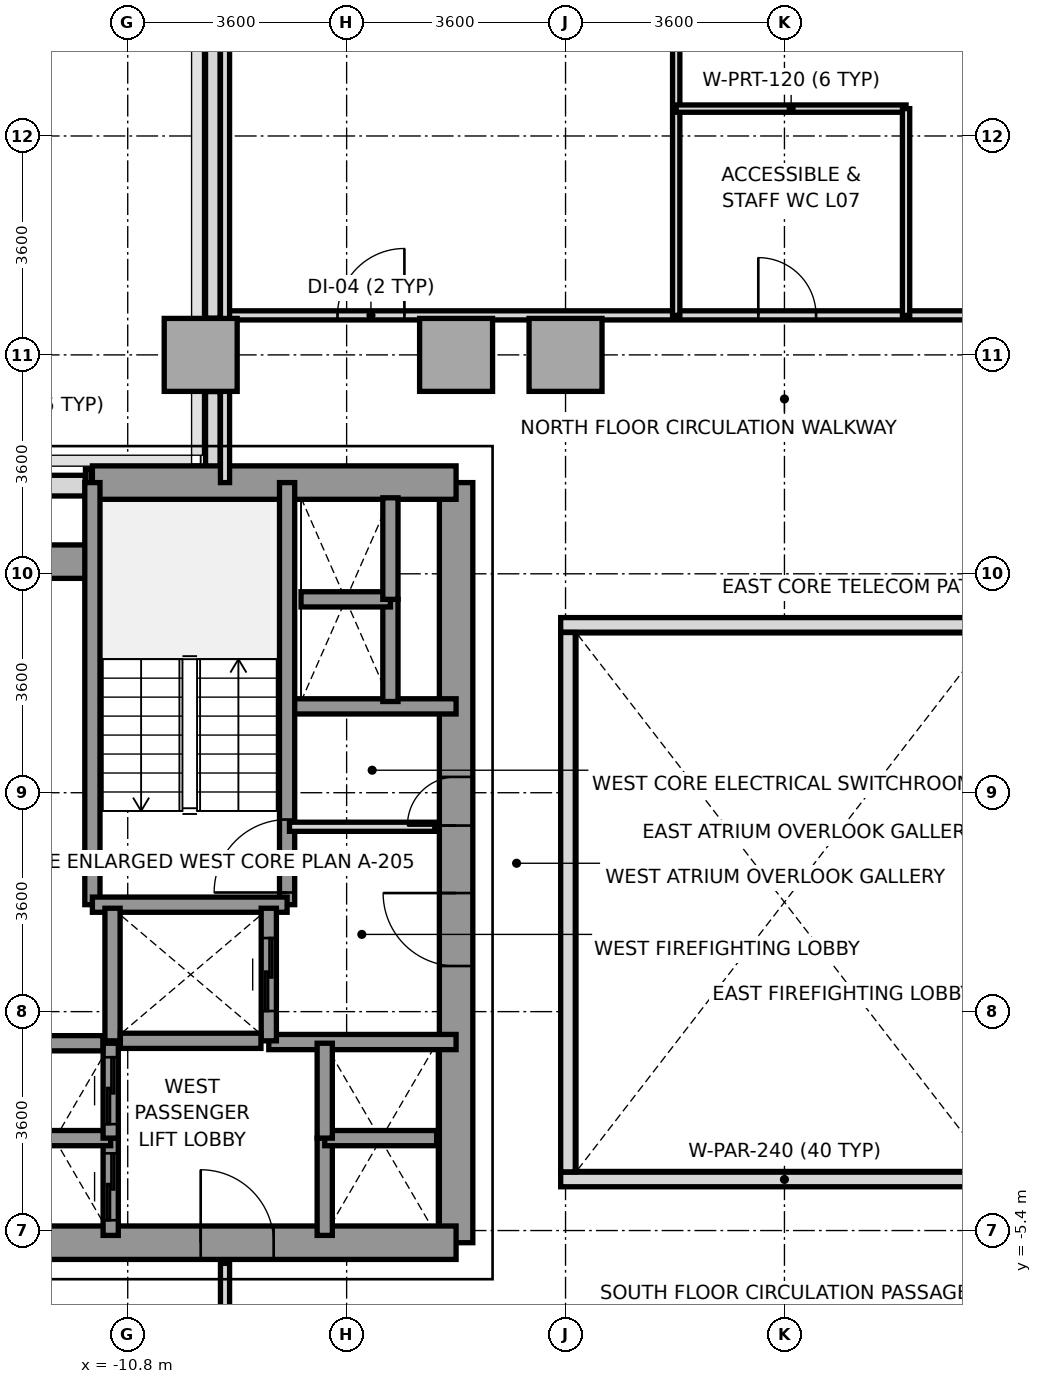
"""IFC4 building model, lengths in metres.
Left out: names, types, materials, properties, quantities, classifications, styles, units other than length and angle.
Written with IfcOpenShell. Run it as: python <this file> out.ifc"""

import sys

from ifc_helpers import new_model, si_unit, direction, frame, frame_2d, origin, origin_2d, place, context, subcontext, project, spatial, rectangle, extrude, source, transform, mapped, element, fill, save


model = new_model("IFC4")
c1 = context("Model", 3, precision=1e-05, world=origin(), true_north=direction((0.0, 1.0)))
c2 = subcontext(c1, "Body", "Model", "MODEL_VIEW")
j1 = project(units=[si_unit("LENGTHUNIT", "METRE"), si_unit("PLANEANGLEUNIT", "RADIAN")], contexts=[c1])
p1 = place(None, origin())
s1 = spatial("IfcSite", under=j1, at=p1, CompositionType="ELEMENT")
p2 = place(p1, origin())
s2 = spatial("IfcBuilding", under=s1, at=p2, CompositionType="ELEMENT")
p3 = place(p2, frame((0.0, 0.0, 34.0)))
s3 = spatial("IfcBuildingStorey", under=s2, at=p3, CompositionType="ELEMENT", Elevation=34.0)
m1 = source(origin(), c2, "Body", "SweptSolid", [
    extrude(rectangle(XDim=1.2, YDim=1.2, at=origin_2d()), origin(), (0.0, 0.0, 1.0), 3.2),
])
for number, where, z_axis, x_axis in (
    (1, (-9.6, 9.0, 0.0), (0.0, 0.0, 1.0), (1.0, 0.0, 0.0)),
    (2, (-5.4, 9.0, 0.0), (0.0, 0.0, 1.0), (1.0, 0.0, 0.0)),
    (3, (-3.6, 9.0, 0.0), (0.0, 0.0, 1.0), (1.0, 0.0, 0.0)),
):
    element("IfcColumn", number, at=place(p3, frame(where, z_axis=z_axis, x_axis=x_axis)), inside=s3, PredefinedType="COLUMN", context=c2, shape_type="MappedRepresentation", body=[
        mapped(m1, transform((0.0, 0.0, 0.0), x_axis=(1.0, 0.0, 0.0), y_axis=(0.0, 1.0, 0.0), z_axis=(0.0, 0.0, 1.0), scale=1.0)),
    ])
p4 = place(p3, frame((-14.033, 6.85, 0.0), z_axis=(0.0, 0.0, 1.0), x_axis=(1.0, 0.0, 0.0)))
e4 = element("IfcWall", 4, at=p4, inside=s3, PredefinedType="SOLIDWALL", context=c2, shape_type="SweptSolid", body=[
    extrude(rectangle(XDim=2.535, YDim=0.34, at=frame_2d((1.268, 0.0))), origin(), (0.0, 0.0, 1.0), 3.2),
])
p5 = place(p3, frame((-11.495, 7.0, 0.0), z_axis=(0.0, 0.0, 1.0), x_axis=(1.0, 0.0, 0.0)))
e5 = element("IfcWall", 5, at=p5, inside=s3, PredefinedType="PARAPET", context=c2, shape_type="SweptSolid", body=[
    extrude(rectangle(XDim=0.092, YDim=0.24, at=frame_2d((0.046, 0.0))), origin(), (0.0, 0.0, 1.0), 1.15),
])
p6 = place(p3, frame((-9.4, 6.953, 0.0), z_axis=(0.0, 0.0, 1.0), x_axis=(0.0, 1.0, 0.0)))
e6 = element("IfcWall", 6, at=p6, inside=s3, PredefinedType="PARAPET", context=c2, shape_type="SweptSolid", body=[
    extrude(rectangle(XDim=1.444, YDim=0.24, at=frame_2d((0.722, 0.0))), origin(), (0.0, 0.0, 1.0), 1.15),
])
p7 = place(p3, frame((-9.4, 9.603, 0.0), z_axis=(0.0, 0.0, 1.0), x_axis=(0.0, 1.0, 0.0)))
e7 = element("IfcWall", 7, at=p7, inside=s3, PredefinedType="PARAPET", context=c2, shape_type="SweptSolid", body=[
    extrude(rectangle(XDim=6.0, YDim=0.24, at=frame_2d((3.0, 0.0))), origin(), (0.0, 0.0, 1.0), 1.15),
])
p8 = place(p3, frame((-5.4, -5.6, 0.0), z_axis=(0.0, 0.0, 1.0), x_axis=(0.0, 1.0, 0.0)))
e8 = element("IfcWall", 8, at=p8, inside=s3, PredefinedType="SHEAR", context=c2, shape_type="SweptSolid", body=[
    extrude(rectangle(XDim=12.5, YDim=0.55, at=frame_2d((6.25, 0.0))), origin(), (0.0, 0.0, 1.0), 3.2),
])
p9 = place(p8, frame((4.55, 0.0, 0.0)))
e9 = element("IfcOpeningElement", 9, at=p9, cuts=e8, PredefinedType="OPENING", context=c2, shape_type="SweptSolid", body=[
    extrude(rectangle(XDim=1.2, YDim=2.2, at=frame_2d((0.6, 1.1))), frame((0.0, 0.285, 0.0), z_axis=(0.0, -1.0, 0.0), x_axis=(1.0, 0.0, 0.0)), (0.0, 0.0, 1.0), 0.57),
])
p10 = place(p8, frame((6.86, 0.0, 0.0)))
e10 = element("IfcOpeningElement", 10, at=p10, cuts=e8, PredefinedType="OPENING", context=c2, shape_type="SweptSolid", body=[
    extrude(rectangle(XDim=0.8, YDim=2.1, at=frame_2d((0.4, 1.05))), frame((0.0, 0.285, 0.0), z_axis=(0.0, -1.0, 0.0), x_axis=(1.0, 0.0, 0.0)), (0.0, 0.0, 1.0), 0.57),
])
p11 = place(p3, frame((-11.381, 6.9, 0.0), z_axis=(0.0, 0.0, 1.0), x_axis=(1.0, 0.0, 0.0)))
e11 = element("IfcWall", 11, at=p11, inside=s3, PredefinedType="SHEAR", context=c2, shape_type="SweptSolid", body=[
    extrude(rectangle(XDim=5.981, YDim=0.55, at=frame_2d((2.991, 0.0))), origin(), (0.0, 0.0, 1.0), 3.2),
])
p12 = place(p3, frame((-13.2, 5.6, 0.0), z_axis=(0.0, 0.0, 1.0), x_axis=(1.0, 0.0, 0.0)))
e12 = element("IfcWall", 12, at=p12, inside=s3, PredefinedType="SHEAR", context=c2, shape_type="SweptSolid", body=[
    extrude(rectangle(XDim=1.819, YDim=0.55, at=frame_2d((0.909, 0.0))), origin(), (0.0, 0.0, 1.0), 3.2),
])
p13 = place(p3, frame((-13.2, -5.6, 0.0), z_axis=(0.0, 0.0, 1.0), x_axis=(1.0, 0.0, 0.0)))
e13 = element("IfcWall", 13, at=p13, inside=s3, PredefinedType="SHEAR", context=c2, shape_type="SweptSolid", body=[
    extrude(rectangle(XDim=7.8, YDim=0.55, at=frame_2d((3.9, 0.0))), origin(), (0.0, 0.0, 1.0), 3.2),
])
p14 = place(p13, frame((3.6, 0.0, 0.0)))
e14 = element("IfcOpeningElement", 14, at=p14, cuts=e13, PredefinedType="OPENING", context=c2, shape_type="SweptSolid", body=[
    extrude(rectangle(XDim=1.2, YDim=2.2, at=frame_2d((0.6, 1.1))), frame((0.0, 0.285, 0.0), z_axis=(0.0, -1.0, 0.0), x_axis=(1.0, 0.0, 0.0)), (0.0, 0.0, 1.0), 0.57),
])
p15 = place(p3, frame((-8.18, 3.22, 0.0), z_axis=(0.0, 0.0, 1.0), x_axis=(1.0, 0.0, 0.0)))
e15 = element("IfcWall", 15, at=p15, inside=s3, PredefinedType="SOLIDWALL", context=c2, shape_type="SweptSolid", body=[
    extrude(rectangle(XDim=2.78, YDim=0.25, at=frame_2d((1.39, 0.0))), origin(), (0.0, 0.0, 1.0), 3.2),
])
p16 = place(p3, frame((-8.48, -2.3, 0.0), z_axis=(0.0, 0.0, 1.0), x_axis=(1.0, 0.0, 0.0)))
e16 = element("IfcWall", 16, at=p16, inside=s3, PredefinedType="SOLIDWALL", context=c2, shape_type="SweptSolid", body=[
    extrude(rectangle(XDim=3.08, YDim=0.25, at=frame_2d((1.54, 0.0))), origin(), (0.0, 0.0, 1.0), 3.2),
])
p17 = place(p3, frame((-8.179, -0.041, 0.0), z_axis=(0.0, 0.0, 1.0), x_axis=(0.0, 1.0, 0.0)))
e17 = element("IfcWall", 17, at=p17, inside=s3, PredefinedType="SOLIDWALL", context=c2, shape_type="SweptSolid", body=[
    extrude(rectangle(XDim=6.941, YDim=0.25, at=frame_2d((3.47, 0.0))), origin(), (0.0, 0.0, 1.0), 3.2),
])
p18 = place(p17, frame((0.2, 0.0, 0.0)))
e18 = element("IfcOpeningElement", 18, at=p18, cuts=e17, PredefinedType="OPENING", context=c2, shape_type="SweptSolid", body=[
    extrude(rectangle(XDim=1.2, YDim=2.2, at=frame_2d((0.6, 1.1))), frame((0.0, 0.135, 0.0), z_axis=(0.0, -1.0, 0.0), x_axis=(1.0, 0.0, 0.0)), (0.0, 0.0, 1.0), 0.27),
])
p19 = place(p3, frame((-11.381, -0.041, 0.0), z_axis=(0.0, 0.0, 1.0), x_axis=(0.0, 1.0, 0.0)))
e19 = element("IfcWall", 19, at=p19, inside=s3, PredefinedType="SOLIDWALL", context=c2, shape_type="SweptSolid", body=[
    extrude(rectangle(XDim=6.941, YDim=0.25, at=frame_2d((3.47, 0.0))), origin(), (0.0, 0.0, 1.0), 3.2),
])
p20 = place(p3, frame((-11.381, -0.041, 0.0), z_axis=(0.0, 0.0, 1.0), x_axis=(1.0, 0.0, 0.0)))
e20 = element("IfcWall", 20, at=p20, inside=s3, PredefinedType="SOLIDWALL", context=c2, shape_type="SweptSolid", body=[
    extrude(rectangle(XDim=3.202, YDim=0.25, at=frame_2d((1.601, 0.0))), origin(), (0.0, 0.0, 1.0), 3.2),
])
p21 = place(p3, frame((-11.05, -2.28, 0.0), z_axis=(0.0, 0.0, 1.0), x_axis=(0.0, 1.0, 0.0)))
e21 = element("IfcWall", 21, at=p21, inside=s3, PredefinedType="SOLIDWALL", context=c2, shape_type="SweptSolid", body=[
    extrude(rectangle(XDim=2.18, YDim=0.25, at=frame_2d((1.09, 0.0))), origin(), (0.0, 0.0, 1.0), 3.2),
])
p22 = place(p3, frame((-8.48, -2.28, 0.0), z_axis=(0.0, 0.0, 1.0), x_axis=(0.0, 1.0, 0.0)))
e22 = element("IfcWall", 22, at=p22, inside=s3, PredefinedType="SOLIDWALL", context=c2, shape_type="SweptSolid", body=[
    extrude(rectangle(XDim=2.18, YDim=0.25, at=frame_2d((1.09, 0.0))), origin(), (0.0, 0.0, 1.0), 3.2),
])
p23 = place(p22, frame((0.49, 0.0, 0.0)))
e23 = element("IfcOpeningElement", 23, at=p23, cuts=e22, PredefinedType="OPENING", context=c2, shape_type="SweptSolid", body=[
    extrude(rectangle(XDim=1.2, YDim=2.2, at=frame_2d((0.6, 1.1))), frame((0.0, 0.135, 0.0), z_axis=(0.0, -1.0, 0.0), x_axis=(1.0, 0.0, 0.0)), (0.0, 0.0, 1.0), 0.27),
])
p24 = place(p3, frame((-10.921, -2.28, 0.0), z_axis=(0.0, 0.0, 1.0), x_axis=(1.0, 0.0, 0.0)))
e24 = element("IfcWall", 24, at=p24, inside=s3, PredefinedType="SOLIDWALL", context=c2, shape_type="SweptSolid", body=[
    extrude(rectangle(XDim=2.312, YDim=0.25, at=frame_2d((1.156, 0.0))), origin(), (0.0, 0.0, 1.0), 3.2),
])
p25 = place(p3, frame((-11.08, -5.48, 0.0), z_axis=(0.0, 0.0, 1.0), x_axis=(0.0, 1.0, 0.0)))
e25 = element("IfcWall", 25, at=p25, inside=s3, PredefinedType="SOLIDWALL", context=c2, shape_type="SweptSolid", body=[
    extrude(rectangle(XDim=1.6, YDim=0.25, at=frame_2d((0.8, 0.0))), origin(), (0.0, 0.0, 1.0), 3.2),
])
p26 = place(p25, frame((0.25, 0.0, 0.0)))
e26 = element("IfcOpeningElement", 26, at=p26, cuts=e25, PredefinedType="OPENING", context=c2, shape_type="SweptSolid", body=[
    extrude(rectangle(XDim=1.1, YDim=2.2, at=frame_2d((0.55, 1.1))), frame((0.0, 0.135, 0.0), z_axis=(0.0, -1.0, 0.0), x_axis=(1.0, 0.0, 0.0)), (0.0, 0.0, 1.0), 0.27),
])
p27 = place(p3, frame((-12.92, -3.88, 0.0), z_axis=(0.0, 0.0, 1.0), x_axis=(1.0, 0.0, 0.0)))
e27 = element("IfcWall", 27, at=p27, inside=s3, PredefinedType="SOLIDWALL", context=c2, shape_type="SweptSolid", body=[
    extrude(rectangle(XDim=1.84, YDim=0.25, at=frame_2d((0.92, 0.0))), origin(), (0.0, 0.0, 1.0), 3.2),
])
p28 = place(p3, frame((-11.08, -3.88, 0.0), z_axis=(0.0, 0.0, 1.0), x_axis=(0.0, 1.0, 0.0)))
e28 = element("IfcWall", 28, at=p28, inside=s3, PredefinedType="SOLIDWALL", context=c2, shape_type="SweptSolid", body=[
    extrude(rectangle(XDim=1.56, YDim=0.25, at=frame_2d((0.78, 0.0))), origin(), (0.0, 0.0, 1.0), 3.2),
])
p29 = place(p28, frame((0.23, 0.0, 0.0)))
e29 = element("IfcOpeningElement", 29, at=p29, cuts=e28, PredefinedType="OPENING", context=c2, shape_type="SweptSolid", body=[
    extrude(rectangle(XDim=1.1, YDim=2.2, at=frame_2d((0.55, 1.1))), frame((0.0, 0.135, 0.0), z_axis=(0.0, -1.0, 0.0), x_axis=(1.0, 0.0, 0.0)), (0.0, 0.0, 1.0), 0.27),
])
p30 = place(p3, frame((-12.791, -2.32, 0.0), z_axis=(0.0, 0.0, 1.0), x_axis=(1.0, 0.0, 0.0)))
e30 = element("IfcWall", 30, at=p30, inside=s3, PredefinedType="SOLIDWALL", context=c2, shape_type="SweptSolid", body=[
    extrude(rectangle(XDim=1.582, YDim=0.25, at=frame_2d((0.791, 0.0))), origin(), (0.0, 0.0, 1.0), 3.2),
])
p31 = place(p3, frame((-7.56, -5.48, 0.0), z_axis=(0.0, 0.0, 1.0), x_axis=(0.0, 1.0, 0.0)))
e31 = element("IfcWall", 31, at=p31, inside=s3, PredefinedType="SOLIDWALL", context=c2, shape_type="SweptSolid", body=[
    extrude(rectangle(XDim=1.6, YDim=0.25, at=frame_2d((0.8, 0.0))), origin(), (0.0, 0.0, 1.0), 3.2),
])
p32 = place(p3, frame((-7.56, -3.88, 0.0), z_axis=(0.0, 0.0, 1.0), x_axis=(1.0, 0.0, 0.0)))
e32 = element("IfcWall", 32, at=p32, inside=s3, PredefinedType="SOLIDWALL", context=c2, shape_type="SweptSolid", body=[
    extrude(rectangle(XDim=1.84, YDim=0.25, at=frame_2d((0.92, 0.0))), origin(), (0.0, 0.0, 1.0), 3.2),
])
p33 = place(p3, frame((-7.56, -3.88, 0.0), z_axis=(0.0, 0.0, 1.0), x_axis=(0.0, 1.0, 0.0)))
e33 = element("IfcWall", 33, at=p33, inside=s3, PredefinedType="SOLIDWALL", context=c2, shape_type="SweptSolid", body=[
    extrude(rectangle(XDim=1.56, YDim=0.25, at=frame_2d((0.78, 0.0))), origin(), (0.0, 0.0, 1.0), 3.2),
])
p34 = place(p3, frame((-6.48, 3.3, 0.0), z_axis=(0.0, 0.0, 1.0), x_axis=(0.0, 1.0, 0.0)))
e34 = element("IfcWall", 34, at=p34, inside=s3, PredefinedType="SOLIDWALL", context=c2, shape_type="SweptSolid", body=[
    extrude(rectangle(XDim=1.68, YDim=0.25, at=frame_2d((0.84, 0.0))), origin(), (0.0, 0.0, 1.0), 3.2),
])
p35 = place(p3, frame((-7.95, 4.98, 0.0), z_axis=(0.0, 0.0, 1.0), x_axis=(1.0, 0.0, 0.0)))
e35 = element("IfcWall", 35, at=p35, inside=s3, PredefinedType="SOLIDWALL", context=c2, shape_type="SweptSolid", body=[
    extrude(rectangle(XDim=1.47, YDim=0.25, at=frame_2d((0.735, 0.0))), origin(), (0.0, 0.0, 1.0), 3.2),
])
p36 = place(p3, frame((-6.48, 4.98, 0.0), z_axis=(0.0, 0.0, 1.0), x_axis=(0.0, 1.0, 0.0)))
e36 = element("IfcWall", 36, at=p36, inside=s3, PredefinedType="SOLIDWALL", context=c2, shape_type="SweptSolid", body=[
    extrude(rectangle(XDim=1.67, YDim=0.25, at=frame_2d((0.835, 0.0))), origin(), (0.0, 0.0, 1.0), 3.2),
])
p37 = place(p3, frame((-8.14, 1.24, 0.0), z_axis=(0.0, 0.0, 1.0), x_axis=(1.0, 0.0, 0.0)))
e37 = element("IfcWall", 37, at=p37, inside=s3, PredefinedType="PARTITIONING", context=c2, shape_type="SweptSolid", body=[
    extrude(rectangle(XDim=2.39, YDim=0.15, at=frame_2d((1.195, 0.0))), origin(), (0.0, 0.0, 1.0), 2.3),
])
p38 = place(p3, frame((-9.2, 9.65, 0.0), z_axis=(0.0, 0.0, 1.0), x_axis=(1.0, 0.0, 0.0)))
e38 = element("IfcWall", 38, at=p38, inside=s3, PredefinedType="PARTITIONING", context=c2, shape_type="SweptSolid", body=[
    extrude(rectangle(XDim=18.4, YDim=0.15, at=frame_2d((9.2, 0.0))), origin(), (0.0, 0.0, 1.0), 3.2),
])
p39 = place(p38, frame((8.77, 0.0, 0.0)))
e39 = element("IfcOpeningElement", 39, at=p39, cuts=e38, PredefinedType="OPENING", context=c2, shape_type="SweptSolid", body=[
    extrude(rectangle(XDim=0.95, YDim=2.15, at=frame_2d((0.475, 1.075))), frame((0.0, 0.085, 0.0), z_axis=(0.0, -1.0, 0.0), x_axis=(1.0, 0.0, 0.0)), (0.0, 0.0, 1.0), 0.17),
])
p40 = place(p38, frame((1.85, 0.0, 0.0)))
e40 = element("IfcOpeningElement", 40, at=p40, cuts=e38, PredefinedType="OPENING", context=c2, shape_type="SweptSolid", body=[
    extrude(rectangle(XDim=1.1, YDim=2.2, at=frame_2d((0.55, 1.1))), frame((0.0, 0.085, 0.0), z_axis=(0.0, -1.0, 0.0), x_axis=(1.0, 0.0, 0.0)), (0.0, 0.0, 1.0), 0.17),
])
p41 = place(p38, frame((15.6, 0.0, 0.0)))
e41 = element("IfcOpeningElement", 41, at=p41, cuts=e38, PredefinedType="OPENING", context=c2, shape_type="SweptSolid", body=[
    extrude(rectangle(XDim=0.95, YDim=2.15, at=frame_2d((0.475, 1.075))), frame((0.0, 0.085, 0.0), z_axis=(0.0, -1.0, 0.0), x_axis=(1.0, 0.0, 0.0)), (0.0, 0.0, 1.0), 0.17),
])
p42 = place(p3, frame((-9.2, 6.9, 0.0), z_axis=(0.0, 0.0, 1.0), x_axis=(0.0, 1.0, 0.0)))
e42 = element("IfcWall", 42, at=p42, inside=s3, PredefinedType="PARTITIONING", context=c2, shape_type="SweptSolid", body=[
    extrude(rectangle(XDim=8.78, YDim=0.15, at=frame_2d((4.39, 0.0))), origin(), (0.0, 0.0, 1.0), 2.71),
])
p43 = place(p3, frame((-1.78, 9.65, 0.0), z_axis=(0.0, 0.0, 1.0), x_axis=(0.0, 1.0, 0.0)))
e43 = element("IfcWall", 43, at=p43, inside=s3, PredefinedType="PARTITIONING", context=c2, shape_type="SweptSolid", body=[
    extrude(rectangle(XDim=15.0, YDim=0.12, at=frame_2d((7.5, 0.0))), origin(), (0.0, 0.0, 1.0), 2.71),
])
p44 = place(p3, frame((-1.78, 13.05, 0.0), z_axis=(0.0, 0.0, 1.0), x_axis=(1.0, 0.0, 0.0)))
e44 = element("IfcWall", 44, at=p44, inside=s3, PredefinedType="PARTITIONING", context=c2, shape_type="SweptSolid", body=[
    extrude(rectangle(XDim=3.78, YDim=0.12, at=frame_2d((1.89, 0.0))), origin(), (0.0, 0.0, 1.0), 3.2),
])
p45 = place(p3, frame((2.0, 9.65, 0.0), z_axis=(0.0, 0.0, 1.0), x_axis=(0.0, 1.0, 0.0)))
e45 = element("IfcWall", 45, at=p45, inside=s3, PredefinedType="PARTITIONING", context=c2, shape_type="SweptSolid", body=[
    extrude(rectangle(XDim=3.4, YDim=0.12, at=frame_2d((1.7, 0.0))), origin(), (0.0, 0.0, 1.0), 3.2),
])
p46 = place(p3, frame((-9.2, -15.68, 0.0), z_axis=(0.0, 0.0, 1.0), x_axis=(0.0, 1.0, 0.0)))
e46 = element("IfcWall", 46, at=p46, inside=s3, PredefinedType="PARTITIONING", context=c2, shape_type="SweptSolid", body=[
    extrude(rectangle(XDim=9.74, YDim=0.15, at=frame_2d((4.87, 0.0))), origin(), (0.0, 0.0, 1.0), 2.71),
])
for number, where, z_axis, x_axis in (
    (47, (-3.68, -4.56, 0.0), (0.0, 0.0, 1.0), (1.0, 0.0, 0.0)),
    (48, (-3.68, 4.56, 0.0), (0.0, 0.0, 1.0), (1.0, 0.0, 0.0)),
):
    element("IfcWall", number, at=place(p3, frame(where, z_axis=z_axis, x_axis=x_axis)), inside=s3, PredefinedType="PARAPET", context=c2, shape_type="SweptSolid", body=[
        extrude(rectangle(XDim=7.36, YDim=0.24, at=frame_2d((3.68, 0.0))), origin(), (0.0, 0.0, 1.0), 1.15),
    ])
p47 = place(p3, frame((-3.56, -4.435, 0.0), z_axis=(0.0, 0.0, 1.0), x_axis=(0.0, 1.0, 0.0)))
e49 = element("IfcWall", 49, at=p47, inside=s3, PredefinedType="PARAPET", context=c2, shape_type="SweptSolid", body=[
    extrude(rectangle(XDim=8.87, YDim=0.24, at=frame_2d((4.435, 0.0))), origin(), (0.0, 0.0, 1.0), 1.15),
])
m2 = source(origin(), c2, "Body", "SweptSolid", [
    extrude(rectangle(XDim=1.2, YDim=2.2, at=frame_2d((0.6, 1.1))), frame((0.0, 0.025, 0.0), z_axis=(0.0, -1.0, 0.0), x_axis=(1.0, 0.0, 0.0)), (0.0, 0.0, 1.0), 0.05),
])
p48 = place(p18, origin())
e50 = element("IfcDoor", 50, at=p48, inside=s3, OperationType="SINGLE_SWING_LEFT", PredefinedType="DOOR", context=c2, shape_type="MappedRepresentation", body=[
    mapped(m2, transform((0.0, 0.0, 0.0), x_axis=(1.0, 0.0, 0.0), y_axis=(0.0, 1.0, 0.0), z_axis=(0.0, 0.0, 1.0), scale=1.0)),
])
fill(e18, e50)
p49 = place(p9, origin())
e51 = element("IfcDoor", 51, at=p49, inside=s3, OperationType="SINGLE_SWING_RIGHT", PredefinedType="DOOR", context=c2, shape_type="MappedRepresentation", body=[
    mapped(m2, transform((0.0, 0.0, 0.0), x_axis=(1.0, 0.0, 0.0), y_axis=(0.0, 1.0, 0.0), z_axis=(0.0, 0.0, 1.0), scale=1.0)),
])
fill(e9, e51)
p50 = place(p14, origin())
e52 = element("IfcDoor", 52, at=p50, inside=s3, OperationType="SINGLE_SWING_LEFT", PredefinedType="DOOR", context=c2, shape_type="MappedRepresentation", body=[
    mapped(m2, transform((0.0, 0.0, 0.0), x_axis=(1.0, 0.0, 0.0), y_axis=(0.0, 1.0, 0.0), z_axis=(0.0, 0.0, 1.0), scale=1.0)),
])
fill(e14, e52)
m3 = source(origin(), c2, "Body", "SweptSolid", [
    extrude(rectangle(XDim=0.8, YDim=2.1, at=frame_2d((0.4, 1.05))), frame((0.0, 0.025, 0.0), z_axis=(0.0, -1.0, 0.0), x_axis=(1.0, 0.0, 0.0)), (0.0, 0.0, 1.0), 0.05),
])
p51 = place(p10, origin())
e53 = element("IfcDoor", 53, at=p51, inside=s3, OperationType="SINGLE_SWING_LEFT", PredefinedType="DOOR", context=c2, shape_type="MappedRepresentation", body=[
    mapped(m3, transform((0.0, 0.0, 0.0), x_axis=(1.0, 0.0, 0.0), y_axis=(0.0, 1.0, 0.0), z_axis=(0.0, 0.0, 1.0), scale=1.0)),
])
fill(e10, e53)
p52 = place(p23, origin())
e54 = element("IfcDoor", 54, at=p52, inside=s3, OperationType="SLIDING_TO_RIGHT", PredefinedType="DOOR", context=c2, shape_type="MappedRepresentation", body=[
    mapped(m2, transform((0.0, 0.0, 0.0), x_axis=(1.0, 0.0, 0.0), y_axis=(0.0, 1.0, 0.0), z_axis=(0.0, 0.0, 1.0), scale=1.0)),
])
fill(e23, e54)
m4 = source(origin(), c2, "Body", "SweptSolid", [
    extrude(rectangle(XDim=1.1, YDim=2.2, at=frame_2d((0.55, 1.1))), frame((0.0, 0.025, 0.0), z_axis=(0.0, -1.0, 0.0), x_axis=(1.0, 0.0, 0.0)), (0.0, 0.0, 1.0), 0.05),
])
p53 = place(p26, origin())
e55 = element("IfcDoor", 55, at=p53, inside=s3, OperationType="SLIDING_TO_LEFT", PredefinedType="DOOR", context=c2, shape_type="MappedRepresentation", body=[
    mapped(m4, transform((0.0, 0.0, 0.0), x_axis=(1.0, 0.0, 0.0), y_axis=(0.0, 1.0, 0.0), z_axis=(0.0, 0.0, 1.0), scale=1.0)),
])
fill(e26, e55)
p54 = place(p29, origin())
e56 = element("IfcDoor", 56, at=p54, inside=s3, OperationType="SLIDING_TO_LEFT", PredefinedType="DOOR", context=c2, shape_type="MappedRepresentation", body=[
    mapped(m4, transform((0.0, 0.0, 0.0), x_axis=(1.0, 0.0, 0.0), y_axis=(0.0, 1.0, 0.0), z_axis=(0.0, 0.0, 1.0), scale=1.0)),
])
fill(e29, e56)
m5 = source(origin(), c2, "Body", "SweptSolid", [
    extrude(rectangle(XDim=0.95, YDim=2.15, at=frame_2d((0.475, 1.075))), frame((0.0, 0.025, 0.0), z_axis=(0.0, -1.0, 0.0), x_axis=(1.0, 0.0, 0.0)), (0.0, 0.0, 1.0), 0.05),
])
p55 = place(p39, origin())
e57 = element("IfcDoor", 57, at=p55, inside=s3, OperationType="SINGLE_SWING_LEFT", PredefinedType="DOOR", context=c2, shape_type="MappedRepresentation", body=[
    mapped(m5, transform((0.0, 0.0, 0.0), x_axis=(1.0, 0.0, 0.0), y_axis=(0.0, 1.0, 0.0), z_axis=(0.0, 0.0, 1.0), scale=1.0)),
])
fill(e39, e57)
p56 = place(p40, origin())
e58 = element("IfcDoor", 58, at=p56, inside=s3, OperationType="SINGLE_SWING_RIGHT", PredefinedType="DOOR", context=c2, shape_type="MappedRepresentation", body=[
    mapped(m4, transform((0.0, 0.0, 0.0), x_axis=(1.0, 0.0, 0.0), y_axis=(0.0, 1.0, 0.0), z_axis=(0.0, 0.0, 1.0), scale=1.0)),
])
fill(e40, e58)
save(model, sys.argv[1])
